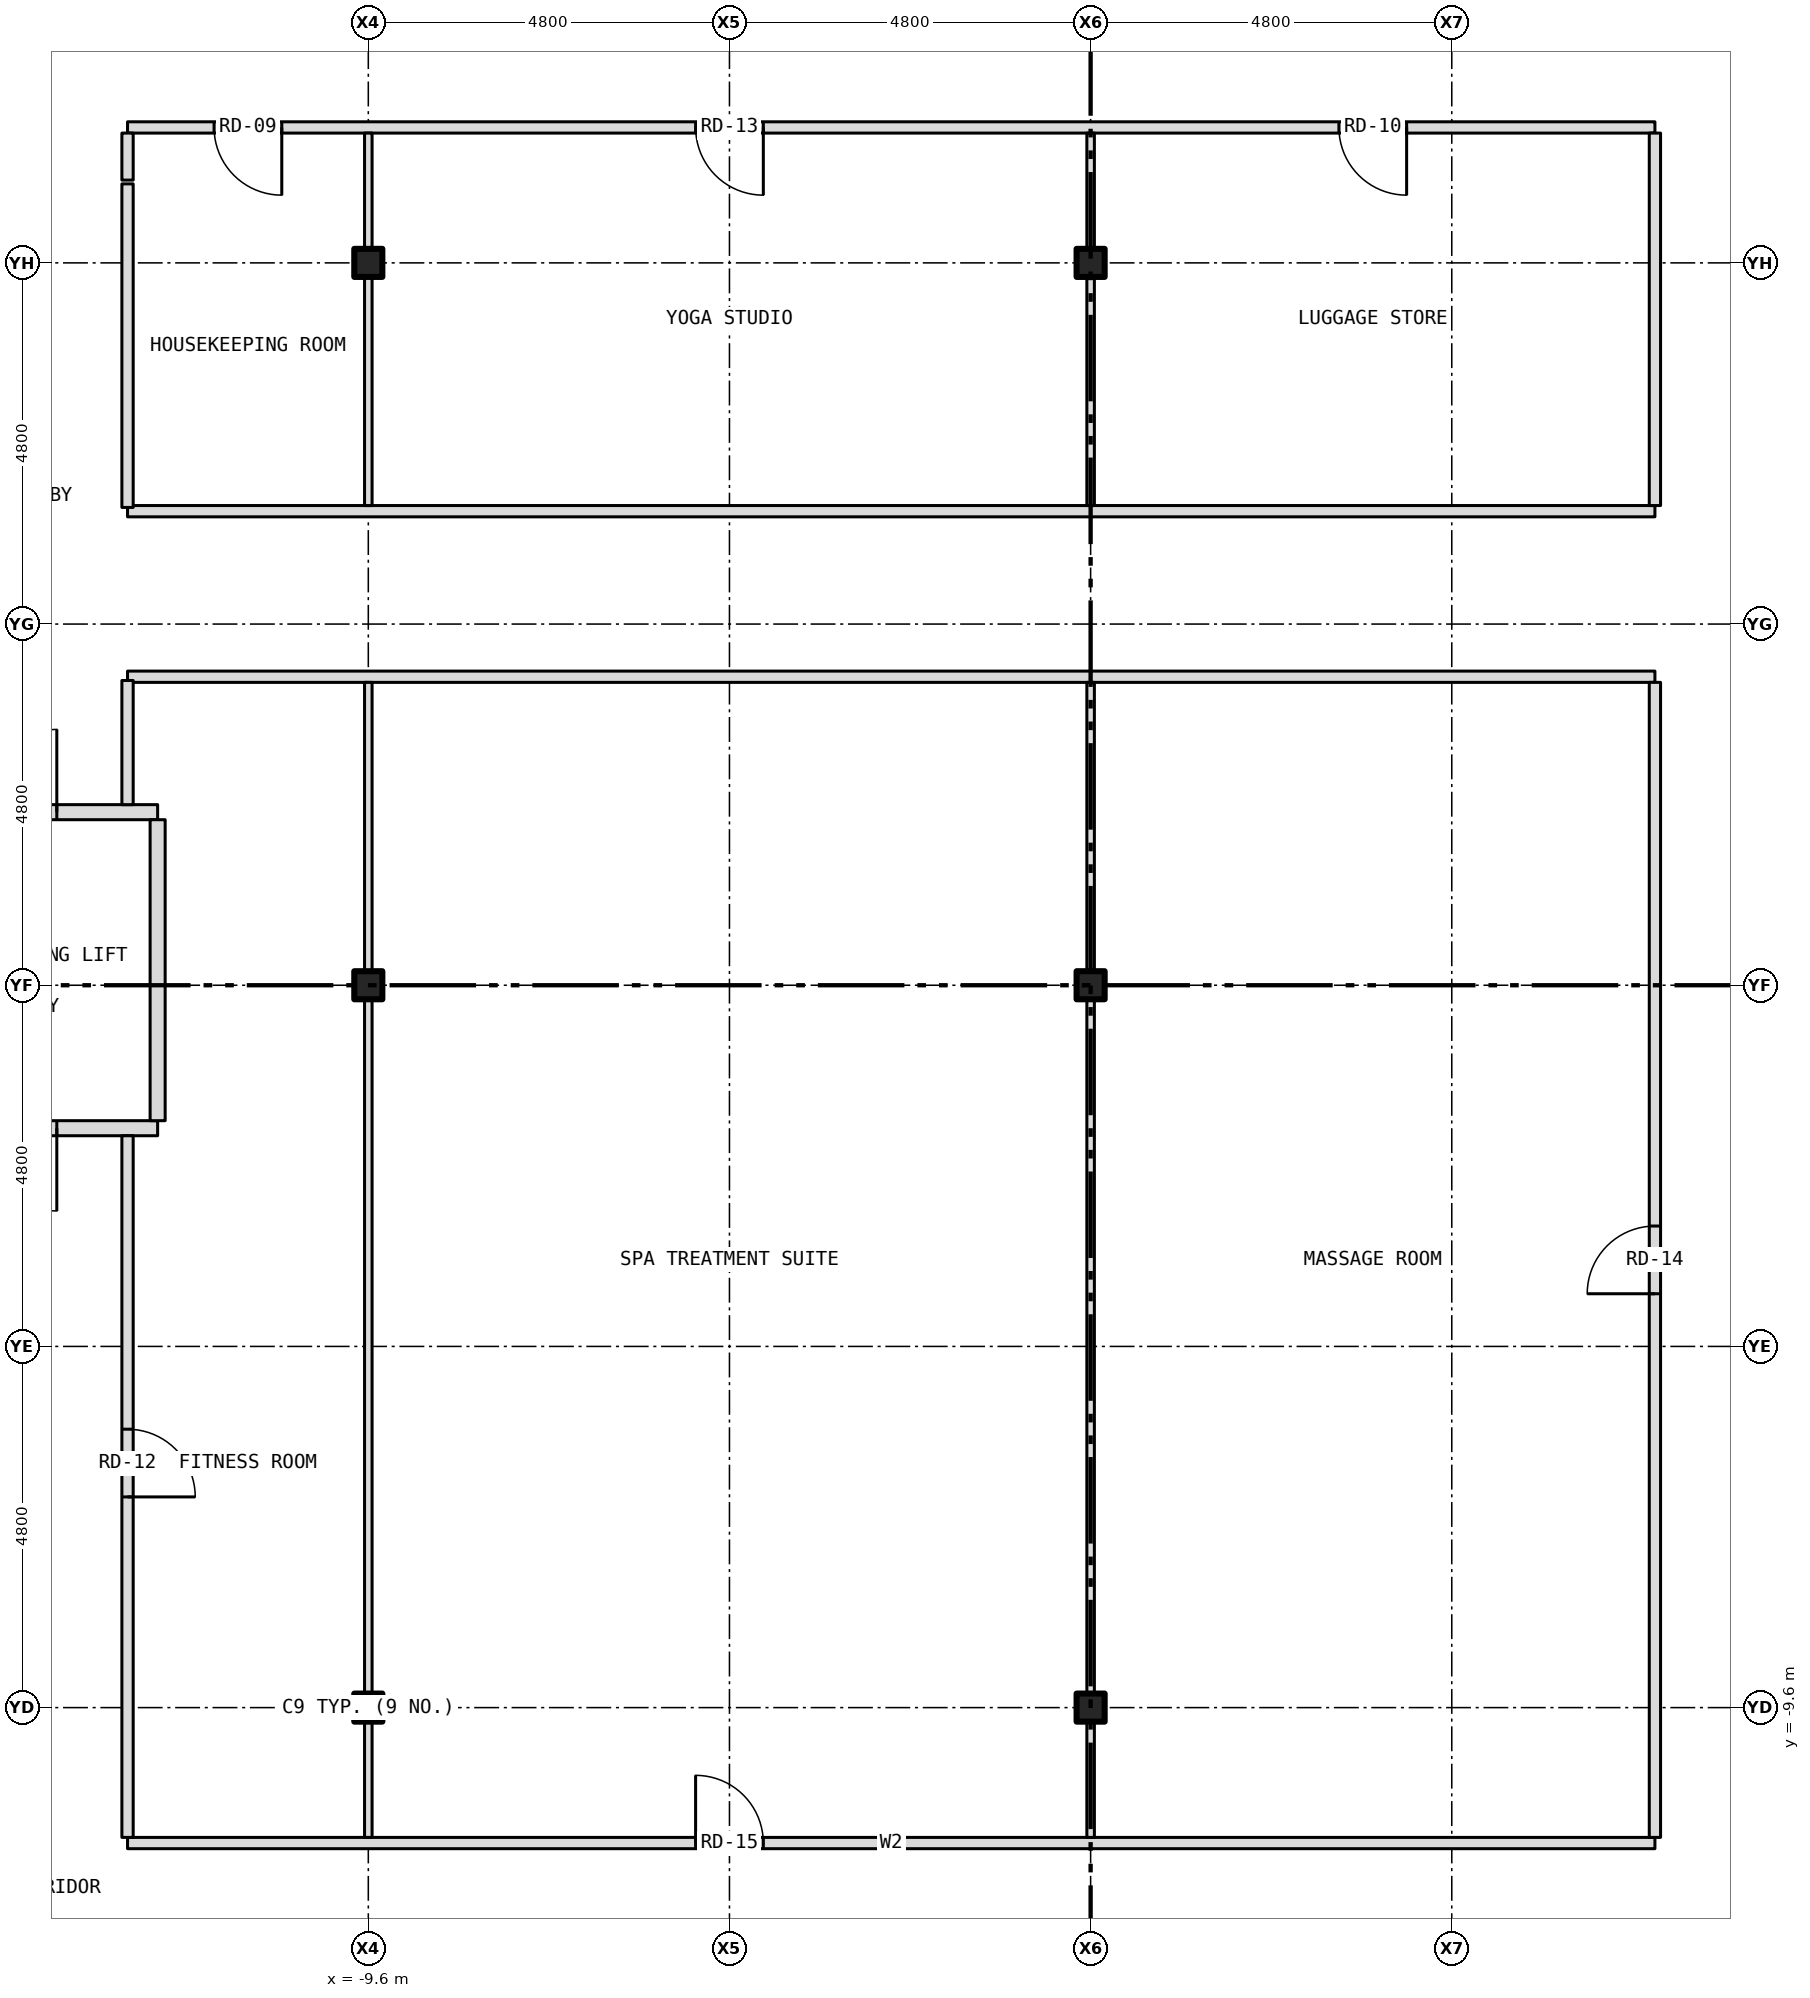
"""IFC4 building model, lengths in metres.
Left out: names, types, materials, properties, quantities, classifications, styles, units other than length and angle.
Written with IfcOpenShell. Run it as: python <this file> out.ifc"""

import sys

from ifc_helpers import new_model, si_unit, direction, frame, frame_2d, origin, origin_2d, place, context, subcontext, project, spatial, rectangle, i_section, extrude, element, fill, save


model = new_model("IFC4")
c1 = context("Model", 3, precision=1e-05, world=origin(), true_north=direction((0.0, 1.0)))
c2 = subcontext(c1, "Body", "Model", "MODEL_VIEW")
j1 = project(units=[si_unit("LENGTHUNIT", "METRE"), si_unit("PLANEANGLEUNIT", "RADIAN")], contexts=[c1])
p1 = place(None, origin())
s1 = spatial("IfcSite", under=j1, at=p1, CompositionType="ELEMENT")
p2 = place(p1, origin())
s2 = spatial("IfcBuilding", under=s1, at=p2, CompositionType="ELEMENT")
p3 = place(p2, frame((0.0, 0.0, 172.5)))
s3 = spatial("IfcBuildingStorey", under=s2, at=p3, CompositionType="ELEMENT", Elevation=172.5)
for number, where, z_axis, x_axis in (
    (1, (-9.6, -9.6, -0.15), (0.0, 0.0, 1.0), (1.0, 0.0, 0.0)),
    (2, (-9.6, 0.0, -0.15), (0.0, 0.0, 1.0), (1.0, 0.0, 0.0)),
    (3, (-9.6, 9.6, -0.15), (0.0, 0.0, 1.0), (1.0, 0.0, 0.0)),
    (4, (0.0, -9.6, -0.15), (0.0, 0.0, 1.0), (1.0, 0.0, 0.0)),
    (5, (0.0, 0.0, -0.15), (0.0, 0.0, 1.0), (1.0, 0.0, 0.0)),
    (6, (0.0, 9.6, -0.15), (0.0, 0.0, 1.0), (1.0, 0.0, 0.0)),
):
    element("IfcColumn", number, at=place(p3, frame(where, z_axis=z_axis, x_axis=x_axis)), inside=s3, PredefinedType="COLUMN", context=c2, shape_type="SweptSolid", body=[
        extrude(i_section(OverallWidth=0.373, OverallDepth=0.373, WebThickness=0.016, FlangeThickness=0.026, at=origin_2d()), origin(), (0.0, 0.0, 1.0), 3.5),
    ])
p4 = place(p3, frame((-12.8, -11.4, 0.0), z_axis=(0.0, 0.0, 1.0), x_axis=(1.0, 0.0, 0.0)))
e7 = element("IfcWall", 7, at=p4, inside=s3, PredefinedType="PARTITIONING", context=c2, shape_type="SweptSolid", body=[
    extrude(rectangle(XDim=20.3, YDim=0.15, at=frame_2d((10.15, 0.0))), origin(), (0.0, 0.0, 1.0), 3.35),
])
p5 = place(p4, frame((7.55, 0.0, 0.0)))
e8 = element("IfcOpeningElement", 8, at=p5, cuts=e7, PredefinedType="OPENING", context=c2, shape_type="SweptSolid", body=[
    extrude(rectangle(XDim=0.9, YDim=2.1, at=frame_2d((0.45, 1.05))), frame((0.0, 0.087, 0.0), z_axis=(0.0, -1.0, 0.0), x_axis=(1.0, 0.0, 0.0)), (0.0, 0.0, 1.0), 0.174),
])
p6 = place(p3, frame((-15.68, -1.9, 0.0), z_axis=(0.0, 0.0, 1.0), x_axis=(1.0, 0.0, 0.0)))
e9 = element("IfcWall", 9, at=p6, inside=s3, PredefinedType="PARTITIONING", context=c2, shape_type="SweptSolid", body=[
    extrude(rectangle(XDim=3.28, YDim=0.2, at=frame_2d((1.64, 0.0))), origin(), (0.0, 0.0, 1.0), 3.35),
])
p7 = place(p6, frame((0.84, 0.0, 0.0)))
e10 = element("IfcOpeningElement", 10, at=p7, cuts=e9, PredefinedType="OPENING", context=c2, shape_type="SweptSolid", body=[
    extrude(rectangle(XDim=1.1, YDim=2.1, at=frame_2d((0.55, 1.05))), frame((0.0, 0.112, 0.0), z_axis=(0.0, -1.0, 0.0), x_axis=(1.0, 0.0, 0.0)), (0.0, 0.0, 1.0), 0.224),
])
p8 = place(p3, frame((-15.68, 2.3, 0.0), z_axis=(0.0, 0.0, 1.0), x_axis=(1.0, 0.0, 0.0)))
e11 = element("IfcWall", 11, at=p8, inside=s3, PredefinedType="PARTITIONING", context=c2, shape_type="SweptSolid", body=[
    extrude(rectangle(XDim=3.28, YDim=0.2, at=frame_2d((1.64, 0.0))), origin(), (0.0, 0.0, 1.0), 3.35),
])
p9 = place(p8, frame((0.84, 0.0, 0.0)))
e12 = element("IfcOpeningElement", 12, at=p9, cuts=e11, PredefinedType="OPENING", context=c2, shape_type="SweptSolid", body=[
    extrude(rectangle(XDim=1.1, YDim=2.1, at=frame_2d((0.55, 1.05))), frame((0.0, 0.112, 0.0), z_axis=(0.0, -1.0, 0.0), x_axis=(1.0, 0.0, 0.0)), (0.0, 0.0, 1.0), 0.224),
])
for number, where, z_axis, x_axis in (
    (13, (-12.8, 4.1, 0.0), (0.0, 0.0, 1.0), (1.0, 0.0, 0.0)),
    (14, (-12.8, 6.3, 0.0), (0.0, 0.0, 1.0), (1.0, 0.0, 0.0)),
):
    element("IfcWall", number, at=place(p3, frame(where, z_axis=z_axis, x_axis=x_axis)), inside=s3, PredefinedType="PARTITIONING", context=c2, shape_type="SweptSolid", body=[
        extrude(rectangle(XDim=20.3, YDim=0.15, at=frame_2d((10.15, 0.0))), origin(), (0.0, 0.0, 1.0), 3.35),
    ])
p10 = place(p3, frame((-12.8, 11.4, 0.0), z_axis=(0.0, 0.0, 1.0), x_axis=(1.0, 0.0, 0.0)))
e15 = element("IfcWall", 15, at=p10, inside=s3, PredefinedType="PARTITIONING", context=c2, shape_type="SweptSolid", body=[
    extrude(rectangle(XDim=20.3, YDim=0.15, at=frame_2d((10.15, 0.0))), origin(), (0.0, 0.0, 1.0), 3.35),
])
p11 = place(p10, frame((1.15, 0.0, 0.0)))
e16 = element("IfcOpeningElement", 16, at=p11, cuts=e15, PredefinedType="OPENING", context=c2, shape_type="SweptSolid", body=[
    extrude(rectangle(XDim=0.9, YDim=2.1, at=frame_2d((0.45, 1.05))), frame((0.0, 0.087, 0.0), z_axis=(0.0, -1.0, 0.0), x_axis=(1.0, 0.0, 0.0)), (0.0, 0.0, 1.0), 0.174),
])
p12 = place(p10, frame((16.1, 0.0, 0.0)))
e17 = element("IfcOpeningElement", 17, at=p12, cuts=e15, PredefinedType="OPENING", context=c2, shape_type="SweptSolid", body=[
    extrude(rectangle(XDim=0.9, YDim=2.1, at=frame_2d((0.45, 1.05))), frame((0.0, 0.087, 0.0), z_axis=(0.0, -1.0, 0.0), x_axis=(1.0, 0.0, 0.0)), (0.0, 0.0, 1.0), 0.174),
])
p13 = place(p10, frame((7.55, 0.0, 0.0)))
e18 = element("IfcOpeningElement", 18, at=p13, cuts=e15, PredefinedType="OPENING", context=c2, shape_type="SweptSolid", body=[
    extrude(rectangle(XDim=0.9, YDim=2.1, at=frame_2d((0.45, 1.05))), frame((0.0, 0.087, 0.0), z_axis=(0.0, -1.0, 0.0), x_axis=(1.0, 0.0, 0.0)), (0.0, 0.0, 1.0), 0.174),
])
p14 = place(p3, frame((-12.8, -11.325, 0.0), z_axis=(0.0, 0.0, 1.0), x_axis=(0.0, 1.0, 0.0)))
e19 = element("IfcWall", 19, at=p14, inside=s3, PredefinedType="PARTITIONING", context=c2, shape_type="SweptSolid", body=[
    extrude(rectangle(XDim=9.325, YDim=0.15, at=frame_2d((4.663, 0.0))), origin(), (0.0, 0.0, 1.0), 3.35),
])
p15 = place(p14, frame((4.525, 0.0, 0.0)))
e20 = element("IfcOpeningElement", 20, at=p15, cuts=e19, PredefinedType="OPENING", context=c2, shape_type="SweptSolid", body=[
    extrude(rectangle(XDim=0.9, YDim=2.1, at=frame_2d((0.45, 1.05))), frame((0.0, 0.087, 0.0), z_axis=(0.0, -1.0, 0.0), x_axis=(1.0, 0.0, 0.0)), (0.0, 0.0, 1.0), 0.174),
])
p16 = place(p3, frame((-12.8, 2.4, 0.0), z_axis=(0.0, 0.0, 1.0), x_axis=(0.0, 1.0, 0.0)))
e21 = element("IfcWall", 21, at=p16, inside=s3, PredefinedType="PARTITIONING", context=c2, shape_type="SweptSolid", body=[
    extrude(rectangle(XDim=1.65, YDim=0.15, at=frame_2d((0.825, 0.0))), origin(), (0.0, 0.0, 1.0), 3.35),
])
p17 = place(p3, frame((-12.8, 6.35, 0.0), z_axis=(0.0, 0.0, 1.0), x_axis=(0.0, 1.0, 0.0)))
e22 = element("IfcWall", 22, at=p17, inside=s3, PredefinedType="PARTITIONING", context=c2, shape_type="SweptSolid", body=[
    extrude(rectangle(XDim=4.3, YDim=0.15, at=frame_2d((2.15, 0.0))), origin(), (0.0, 0.0, 1.0), 3.35),
])
p18 = place(p3, frame((-12.8, 10.7, 0.0), z_axis=(0.0, 0.0, 1.0), x_axis=(0.0, 1.0, 0.0)))
e23 = element("IfcWall", 23, at=p18, inside=s3, PredefinedType="PARTITIONING", context=c2, shape_type="SweptSolid", body=[
    extrude(rectangle(XDim=0.625, YDim=0.15, at=frame_2d((0.312, 0.0))), origin(), (0.0, 0.0, 1.0), 3.35),
])
p19 = place(p3, frame((-12.4, -1.8, 0.0), z_axis=(0.0, 0.0, 1.0), x_axis=(0.0, 1.0, 0.0)))
e24 = element("IfcWall", 24, at=p19, inside=s3, PredefinedType="PARTITIONING", context=c2, shape_type="SweptSolid", body=[
    extrude(rectangle(XDim=4.0, YDim=0.2, at=frame_2d((2.0, 0.0))), origin(), (0.0, 0.0, 1.0), 3.35),
])
p20 = place(p3, frame((-9.6, -11.325, 0.0), z_axis=(0.0, 0.0, 1.0), x_axis=(0.0, 1.0, 0.0)))
e25 = element("IfcWall", 25, at=p20, inside=s3, PredefinedType="PARTITIONING", context=c2, shape_type="SweptSolid", body=[
    extrude(rectangle(XDim=1.538, YDim=0.1, at=frame_2d((0.769, 0.0))), origin(), (0.0, 0.0, 1.0), 2.728),
])
p21 = place(p3, frame((-9.6, -9.787, 0.0), z_axis=(0.0, 0.0, 1.0), x_axis=(0.0, 1.0, 0.0)))
e26 = element("IfcWall", 26, at=p21, inside=s3, PredefinedType="PARTITIONING", context=c2, shape_type="SweptSolid", body=[
    extrude(rectangle(XDim=0.374, YDim=0.1, at=frame_2d((0.187, 0.0))), origin(), (0.0, 0.0, 1.0), 3.35),
])
p22 = place(p3, frame((-9.6, -9.413, 0.0), z_axis=(0.0, 0.0, 1.0), x_axis=(0.0, 1.0, 0.0)))
e27 = element("IfcWall", 27, at=p22, inside=s3, PredefinedType="PARTITIONING", context=c2, shape_type="SweptSolid", body=[
    extrude(rectangle(XDim=9.226, YDim=0.1, at=frame_2d((4.613, 0.0))), origin(), (0.0, 0.0, 1.0), 2.728),
])
p23 = place(p3, frame((-9.6, -0.187, 0.0), z_axis=(0.0, 0.0, 1.0), x_axis=(0.0, 1.0, 0.0)))
e28 = element("IfcWall", 28, at=p23, inside=s3, PredefinedType="PARTITIONING", context=c2, shape_type="SweptSolid", body=[
    extrude(rectangle(XDim=0.374, YDim=0.1, at=frame_2d((0.187, 0.0))), origin(), (0.0, 0.0, 1.0), 3.35),
])
p24 = place(p3, frame((-9.6, 0.187, 0.0), z_axis=(0.0, 0.0, 1.0), x_axis=(0.0, 1.0, 0.0)))
e29 = element("IfcWall", 29, at=p24, inside=s3, PredefinedType="PARTITIONING", context=c2, shape_type="SweptSolid", body=[
    extrude(rectangle(XDim=3.838, YDim=0.1, at=frame_2d((1.919, 0.0))), origin(), (0.0, 0.0, 1.0), 2.728),
])
p25 = place(p3, frame((-9.6, 6.375, 0.0), z_axis=(0.0, 0.0, 1.0), x_axis=(0.0, 1.0, 0.0)))
e30 = element("IfcWall", 30, at=p25, inside=s3, PredefinedType="PARTITIONING", context=c2, shape_type="SweptSolid", body=[
    extrude(rectangle(XDim=3.038, YDim=0.1, at=frame_2d((1.519, 0.0))), origin(), (0.0, 0.0, 1.0), 2.728),
])
p26 = place(p3, frame((-9.6, 9.413, 0.0), z_axis=(0.0, 0.0, 1.0), x_axis=(0.0, 1.0, 0.0)))
e31 = element("IfcWall", 31, at=p26, inside=s3, PredefinedType="PARTITIONING", context=c2, shape_type="SweptSolid", body=[
    extrude(rectangle(XDim=0.374, YDim=0.1, at=frame_2d((0.187, 0.0))), origin(), (0.0, 0.0, 1.0), 3.35),
])
for number, where, z_axis, x_axis in (
    (32, (-9.6, 9.787, 0.0), (0.0, 0.0, 1.0), (0.0, 1.0, 0.0)),
    (33, (0.0, -11.325, 0.0), (0.0, 0.0, 1.0), (0.0, 1.0, 0.0)),
):
    element("IfcWall", number, at=place(p3, frame(where, z_axis=z_axis, x_axis=x_axis)), inside=s3, PredefinedType="PARTITIONING", context=c2, shape_type="SweptSolid", body=[
        extrude(rectangle(XDim=1.538, YDim=0.1, at=frame_2d((0.769, 0.0))), origin(), (0.0, 0.0, 1.0), 2.728),
    ])
p27 = place(p3, frame((0.0, -9.787, 0.0), z_axis=(0.0, 0.0, 1.0), x_axis=(0.0, 1.0, 0.0)))
e34 = element("IfcWall", 34, at=p27, inside=s3, PredefinedType="PARTITIONING", context=c2, shape_type="SweptSolid", body=[
    extrude(rectangle(XDim=0.374, YDim=0.1, at=frame_2d((0.187, 0.0))), origin(), (0.0, 0.0, 1.0), 3.35),
])
p28 = place(p3, frame((0.0, -9.413, 0.0), z_axis=(0.0, 0.0, 1.0), x_axis=(0.0, 1.0, 0.0)))
e35 = element("IfcWall", 35, at=p28, inside=s3, PredefinedType="PARTITIONING", context=c2, shape_type="SweptSolid", body=[
    extrude(rectangle(XDim=9.226, YDim=0.1, at=frame_2d((4.613, 0.0))), origin(), (0.0, 0.0, 1.0), 2.728),
])
p29 = place(p3, frame((0.0, -0.187, 0.0), z_axis=(0.0, 0.0, 1.0), x_axis=(0.0, 1.0, 0.0)))
e36 = element("IfcWall", 36, at=p29, inside=s3, PredefinedType="PARTITIONING", context=c2, shape_type="SweptSolid", body=[
    extrude(rectangle(XDim=0.374, YDim=0.1, at=frame_2d((0.187, 0.0))), origin(), (0.0, 0.0, 1.0), 3.35),
])
p30 = place(p3, frame((0.0, 0.187, 0.0), z_axis=(0.0, 0.0, 1.0), x_axis=(0.0, 1.0, 0.0)))
e37 = element("IfcWall", 37, at=p30, inside=s3, PredefinedType="PARTITIONING", context=c2, shape_type="SweptSolid", body=[
    extrude(rectangle(XDim=3.838, YDim=0.1, at=frame_2d((1.919, 0.0))), origin(), (0.0, 0.0, 1.0), 2.728),
])
p31 = place(p3, frame((0.0, 6.375, 0.0), z_axis=(0.0, 0.0, 1.0), x_axis=(0.0, 1.0, 0.0)))
e38 = element("IfcWall", 38, at=p31, inside=s3, PredefinedType="PARTITIONING", context=c2, shape_type="SweptSolid", body=[
    extrude(rectangle(XDim=3.038, YDim=0.1, at=frame_2d((1.519, 0.0))), origin(), (0.0, 0.0, 1.0), 2.728),
])
p32 = place(p3, frame((0.0, 9.413, 0.0), z_axis=(0.0, 0.0, 1.0), x_axis=(0.0, 1.0, 0.0)))
e39 = element("IfcWall", 39, at=p32, inside=s3, PredefinedType="PARTITIONING", context=c2, shape_type="SweptSolid", body=[
    extrude(rectangle(XDim=0.374, YDim=0.1, at=frame_2d((0.187, 0.0))), origin(), (0.0, 0.0, 1.0), 3.35),
])
p33 = place(p3, frame((0.0, 9.787, 0.0), z_axis=(0.0, 0.0, 1.0), x_axis=(0.0, 1.0, 0.0)))
e40 = element("IfcWall", 40, at=p33, inside=s3, PredefinedType="PARTITIONING", context=c2, shape_type="SweptSolid", body=[
    extrude(rectangle(XDim=1.538, YDim=0.1, at=frame_2d((0.769, 0.0))), origin(), (0.0, 0.0, 1.0), 2.728),
])
p34 = place(p3, frame((7.5, -11.325, 0.0), z_axis=(0.0, 0.0, 1.0), x_axis=(0.0, 1.0, 0.0)))
e41 = element("IfcWall", 41, at=p34, inside=s3, PredefinedType="PARTITIONING", context=c2, shape_type="SweptSolid", body=[
    extrude(rectangle(XDim=15.35, YDim=0.15, at=frame_2d((7.675, 0.0))), origin(), (0.0, 0.0, 1.0), 3.35),
])
p35 = place(p34, frame((7.225, 0.0, 0.0)))
e42 = element("IfcOpeningElement", 42, at=p35, cuts=e41, PredefinedType="OPENING", context=c2, shape_type="SweptSolid", body=[
    extrude(rectangle(XDim=0.9, YDim=2.1, at=frame_2d((0.45, 1.05))), frame((0.0, 0.087, 0.0), z_axis=(0.0, -1.0, 0.0), x_axis=(1.0, 0.0, 0.0)), (0.0, 0.0, 1.0), 0.174),
])
p36 = place(p3, frame((7.5, 6.375, 0.0), z_axis=(0.0, 0.0, 1.0), x_axis=(0.0, 1.0, 0.0)))
e43 = element("IfcWall", 43, at=p36, inside=s3, PredefinedType="PARTITIONING", context=c2, shape_type="SweptSolid", body=[
    extrude(rectangle(XDim=4.95, YDim=0.15, at=frame_2d((2.475, 0.0))), origin(), (0.0, 0.0, 1.0), 3.35),
])
p37 = place(p9, origin())
e44 = element("IfcDoor", 44, at=p37, inside=s3, OperationType="SINGLE_SWING_RIGHT", PredefinedType="DOOR", context=c2, shape_type="SweptSolid", body=[
    extrude(rectangle(XDim=1.1, YDim=2.1, at=frame_2d((0.55, 1.05))), frame((0.0, 0.025, 0.0), z_axis=(0.0, -1.0, 0.0), x_axis=(1.0, 0.0, 0.0)), (0.0, 0.0, 1.0), 0.05),
])
fill(e12, e44)
p38 = place(p7, origin())
e45 = element("IfcDoor", 45, at=p38, inside=s3, OperationType="SINGLE_SWING_RIGHT", PredefinedType="DOOR", context=c2, shape_type="SweptSolid", body=[
    extrude(rectangle(XDim=1.1, YDim=2.1, at=frame_2d((0.55, 1.05))), frame((0.0, 0.025, 0.0), z_axis=(0.0, -1.0, 0.0), x_axis=(1.0, 0.0, 0.0)), (0.0, 0.0, 1.0), 0.05),
])
fill(e10, e45)
p39 = place(p11, origin())
e46 = element("IfcDoor", 46, at=p39, inside=s3, OperationType="SINGLE_SWING_RIGHT", PredefinedType="DOOR", context=c2, shape_type="SweptSolid", body=[
    extrude(rectangle(XDim=0.9, YDim=2.1, at=frame_2d((0.45, 1.05))), frame((0.0, 0.025, 0.0), z_axis=(0.0, -1.0, 0.0), x_axis=(1.0, 0.0, 0.0)), (0.0, 0.0, 1.0), 0.05),
])
fill(e16, e46)
p40 = place(p12, origin())
e47 = element("IfcDoor", 47, at=p40, inside=s3, OperationType="SINGLE_SWING_RIGHT", PredefinedType="DOOR", context=c2, shape_type="SweptSolid", body=[
    extrude(rectangle(XDim=0.9, YDim=2.1, at=frame_2d((0.45, 1.05))), frame((0.0, 0.025, 0.0), z_axis=(0.0, -1.0, 0.0), x_axis=(1.0, 0.0, 0.0)), (0.0, 0.0, 1.0), 0.05),
])
fill(e17, e47)
p41 = place(p15, origin())
e48 = element("IfcDoor", 48, at=p41, inside=s3, OperationType="SINGLE_SWING_LEFT", PredefinedType="DOOR", context=c2, shape_type="SweptSolid", body=[
    extrude(rectangle(XDim=0.9, YDim=2.1, at=frame_2d((0.45, 1.05))), frame((0.0, 0.025, 0.0), z_axis=(0.0, -1.0, 0.0), x_axis=(1.0, 0.0, 0.0)), (0.0, 0.0, 1.0), 0.05),
])
fill(e20, e48)
p42 = place(p13, origin())
e49 = element("IfcDoor", 49, at=p42, inside=s3, OperationType="SINGLE_SWING_RIGHT", PredefinedType="DOOR", context=c2, shape_type="SweptSolid", body=[
    extrude(rectangle(XDim=0.9, YDim=2.1, at=frame_2d((0.45, 1.05))), frame((0.0, 0.025, 0.0), z_axis=(0.0, -1.0, 0.0), x_axis=(1.0, 0.0, 0.0)), (0.0, 0.0, 1.0), 0.05),
])
fill(e18, e49)
p43 = place(p35, origin())
e50 = element("IfcDoor", 50, at=p43, inside=s3, OperationType="SINGLE_SWING_LEFT", PredefinedType="DOOR", context=c2, shape_type="SweptSolid", body=[
    extrude(rectangle(XDim=0.9, YDim=2.1, at=frame_2d((0.45, 1.05))), frame((0.0, 0.025, 0.0), z_axis=(0.0, -1.0, 0.0), x_axis=(1.0, 0.0, 0.0)), (0.0, 0.0, 1.0), 0.05),
])
fill(e42, e50)
p44 = place(p5, origin())
e51 = element("IfcDoor", 51, at=p44, inside=s3, OperationType="SINGLE_SWING_LEFT", PredefinedType="DOOR", context=c2, shape_type="SweptSolid", body=[
    extrude(rectangle(XDim=0.9, YDim=2.1, at=frame_2d((0.45, 1.05))), frame((0.0, 0.025, 0.0), z_axis=(0.0, -1.0, 0.0), x_axis=(1.0, 0.0, 0.0)), (0.0, 0.0, 1.0), 0.05),
])
fill(e8, e51)
save(model, sys.argv[1])
